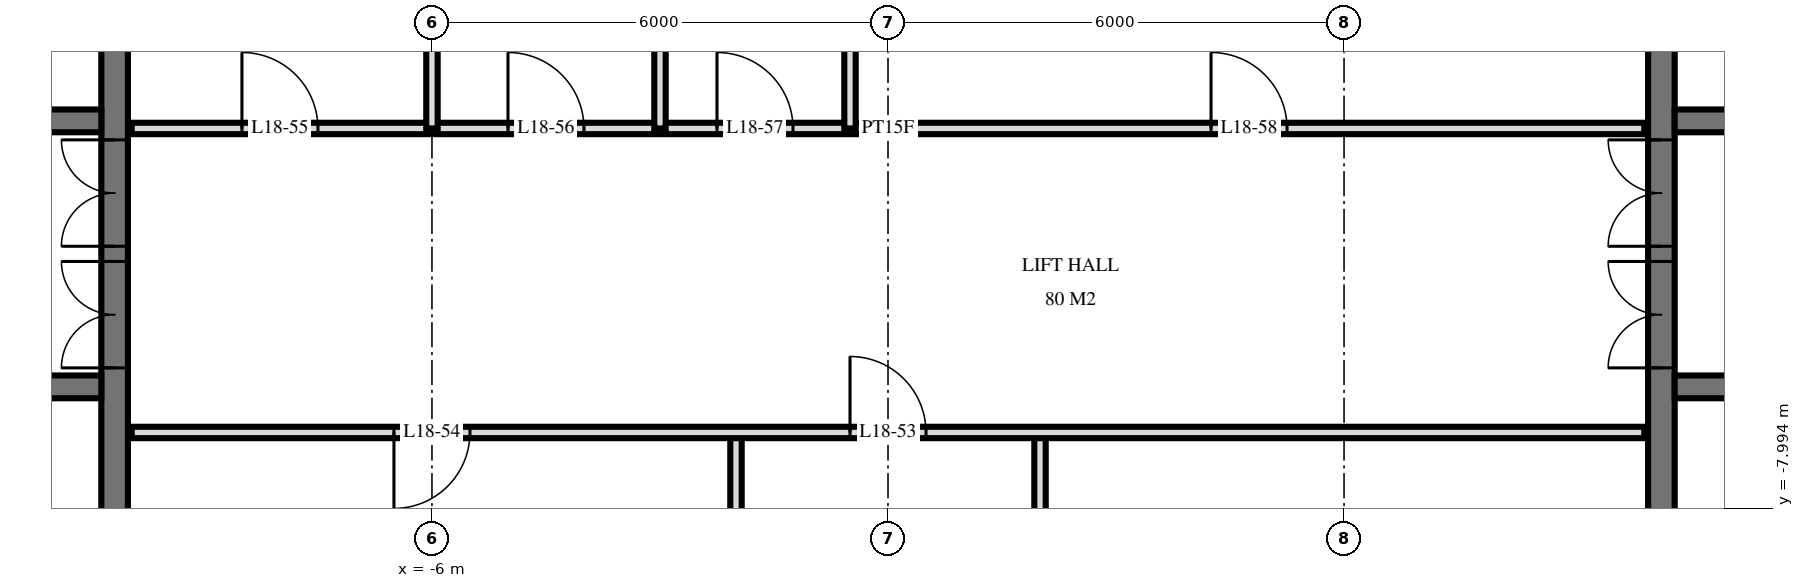
"""IFC4 building model, lengths in metres.
Left out: names, types, materials, properties, quantities, classifications, styles, units other than length and angle.
Written with IfcOpenShell. Run it as: python <this file> out.ifc"""

import sys

from ifc_helpers import new_model, si_unit, direction, frame, frame_2d, origin, place, context, subcontext, project, spatial, rectangle, extrude, element, fill, save


model = new_model("IFC4")
c1 = context("Model", 3, precision=1e-05, world=origin(), true_north=direction((0.0, 1.0)))
c2 = subcontext(c1, "Body", "Model", "MODEL_VIEW")
j1 = project(units=[si_unit("LENGTHUNIT", "METRE"), si_unit("PLANEANGLEUNIT", "RADIAN")], contexts=[c1])
p1 = place(None, origin())
s1 = spatial("IfcSite", under=j1, at=p1, CompositionType="ELEMENT")
p2 = place(p1, origin())
s2 = spatial("IfcBuilding", under=s1, at=p2, CompositionType="ELEMENT")
p3 = place(p2, frame((0.0, 0.0, 74.4)))
s3 = spatial("IfcBuildingStorey", under=s2, at=p3, CompositionType="ELEMENT", Elevation=74.4)
p4 = place(p3, frame((-10.175, -14.55, 0.0), z_axis=(0.0, 0.0, 1.0), x_axis=(0.0, 1.0, 0.0)))
e1 = element("IfcWall", 1, at=p4, inside=s3, PredefinedType="SHEAR", context=c2, shape_type="SweptSolid", body=[
    extrude(rectangle(XDim=14.1, YDim=0.35, at=frame_2d((7.05, 0.0))), origin(), (0.0, 0.0, 1.0), 3.6),
])
p5 = place(p4, frame((8.4, 0.0, 0.0)))
e2 = element("IfcOpeningElement", 2, at=p5, cuts=e1, PredefinedType="OPENING", context=c2, shape_type="SweptSolid", body=[
    extrude(rectangle(XDim=1.4, YDim=2.4, at=frame_2d((0.7, 1.2))), frame((0.0, 0.185, 0.0), z_axis=(0.0, -1.0, 0.0), x_axis=(1.0, 0.0, 0.0)), (0.0, 0.0, 1.0), 0.37),
])
p6 = place(p4, frame((10.0, 0.0, 0.0)))
e3 = element("IfcOpeningElement", 3, at=p6, cuts=e1, PredefinedType="OPENING", context=c2, shape_type="SweptSolid", body=[
    extrude(rectangle(XDim=1.4, YDim=2.4, at=frame_2d((0.7, 1.2))), frame((0.0, 0.185, 0.0), z_axis=(0.0, -1.0, 0.0), x_axis=(1.0, 0.0, 0.0)), (0.0, 0.0, 1.0), 0.37),
])
p7 = place(p4, frame((4.0, 0.0, 0.0)))
e4 = element("IfcOpeningElement", 4, at=p7, cuts=e1, PredefinedType="OPENING", context=c2, shape_type="SweptSolid", body=[
    extrude(rectangle(XDim=1.2, YDim=2.1, at=frame_2d((0.6, 1.05))), frame((0.0, 0.185, 0.0), z_axis=(0.0, -1.0, 0.0), x_axis=(1.0, 0.0, 0.0)), (0.0, 0.0, 1.0), 0.37),
])
p8 = place(p3, frame((-29.05, -2.9, 0.0), z_axis=(0.0, 0.0, 1.0), x_axis=(1.0, 0.0, 0.0)))
e5 = element("IfcWall", 5, at=p8, inside=s3, PredefinedType="SHEAR", context=c2, shape_type="SweptSolid", body=[
    extrude(rectangle(XDim=18.7, YDim=0.3, at=frame_2d((9.35, 0.0))), origin(), (0.0, 0.0, 1.0), 3.6),
])
p9 = place(p8, frame((2.95, 0.0, 0.0)))
e6 = element("IfcOpeningElement", 6, at=p9, cuts=e5, PredefinedType="OPENING", context=c2, shape_type="SweptSolid", body=[
    extrude(rectangle(XDim=1.1, YDim=2.1, at=frame_2d((0.55, 1.05))), frame((0.0, 0.16, 0.0), z_axis=(0.0, -1.0, 0.0), x_axis=(1.0, 0.0, 0.0)), (0.0, 0.0, 1.0), 0.32),
])
p10 = place(p8, frame((0.55, 0.0, 0.0)))
e7 = element("IfcOpeningElement", 7, at=p10, cuts=e5, PredefinedType="OPENING", context=c2, shape_type="SweptSolid", body=[
    extrude(rectangle(XDim=1.1, YDim=2.1, at=frame_2d((0.55, 1.05))), frame((0.0, 0.16, 0.0), z_axis=(0.0, -1.0, 0.0), x_axis=(1.0, 0.0, 0.0)), (0.0, 0.0, 1.0), 0.32),
])
p11 = place(p8, frame((11.863, 0.0, 0.0)))
e8 = element("IfcOpeningElement", 8, at=p11, cuts=e5, PredefinedType="OPENING", context=c2, shape_type="SweptSolid", body=[
    extrude(rectangle(XDim=0.9, YDim=2.1, at=frame_2d((0.45, 1.05))), frame((0.0, 0.16, 0.0), z_axis=(0.0, -1.0, 0.0), x_axis=(1.0, 0.0, 0.0)), (0.0, 0.0, 1.0), 0.32),
])
p12 = place(p8, frame((10.438, 0.0, 0.0)))
e9 = element("IfcOpeningElement", 9, at=p12, cuts=e5, PredefinedType="OPENING", context=c2, shape_type="SweptSolid", body=[
    extrude(rectangle(XDim=0.9, YDim=2.1, at=frame_2d((0.45, 1.05))), frame((0.0, 0.16, 0.0), z_axis=(0.0, -1.0, 0.0), x_axis=(1.0, 0.0, 0.0)), (0.0, 0.0, 1.0), 0.32),
])
p13 = place(p8, frame((16.85, 0.0, 0.0)))
e10 = element("IfcOpeningElement", 10, at=p13, cuts=e5, PredefinedType="OPENING", context=c2, shape_type="SweptSolid", body=[
    extrude(rectangle(XDim=1.0, YDim=2.1, at=frame_2d((0.5, 1.05))), frame((0.0, 0.16, 0.0), z_axis=(0.0, -1.0, 0.0), x_axis=(1.0, 0.0, 0.0)), (0.0, 0.0, 1.0), 0.32),
])
p14 = place(p8, frame((14.562, 0.0, 0.0)))
e11 = element("IfcOpeningElement", 11, at=p14, cuts=e5, PredefinedType="OPENING", context=c2, shape_type="SweptSolid", body=[
    extrude(rectangle(XDim=1.0, YDim=2.1, at=frame_2d((0.5, 1.05))), frame((0.0, 0.16, 0.0), z_axis=(0.0, -1.0, 0.0), x_axis=(1.0, 0.0, 0.0)), (0.0, 0.0, 1.0), 0.32),
])
p15 = place(p8, frame((13.137, 0.0, 0.0)))
e12 = element("IfcOpeningElement", 12, at=p15, cuts=e5, PredefinedType="OPENING", context=c2, shape_type="SweptSolid", body=[
    extrude(rectangle(XDim=1.0, YDim=2.1, at=frame_2d((0.5, 1.05))), frame((0.0, 0.16, 0.0), z_axis=(0.0, -1.0, 0.0), x_axis=(1.0, 0.0, 0.0)), (0.0, 0.0, 1.0), 0.32),
])
p16 = place(p8, frame((5.6, 0.0, 0.0)))
e13 = element("IfcOpeningElement", 13, at=p16, cuts=e5, PredefinedType="OPENING", context=c2, shape_type="SweptSolid", body=[
    extrude(rectangle(XDim=1.0, YDim=2.1, at=frame_2d((0.5, 1.05))), frame((0.0, 0.16, 0.0), z_axis=(0.0, -1.0, 0.0), x_axis=(1.0, 0.0, 0.0)), (0.0, 0.0, 1.0), 0.32),
])
p17 = place(p3, frame((-29.05, -6.4, 0.0), z_axis=(0.0, 0.0, 1.0), x_axis=(1.0, 0.0, 0.0)))
e14 = element("IfcWall", 14, at=p17, inside=s3, PredefinedType="SHEAR", context=c2, shape_type="SweptSolid", body=[
    extrude(rectangle(XDim=18.7, YDim=0.3, at=frame_2d((9.35, 0.0))), origin(), (0.0, 0.0, 1.0), 3.6),
])
p18 = place(p17, frame((2.95, 0.0, 0.0)))
e15 = element("IfcOpeningElement", 15, at=p18, cuts=e14, PredefinedType="OPENING", context=c2, shape_type="SweptSolid", body=[
    extrude(rectangle(XDim=1.1, YDim=2.1, at=frame_2d((0.55, 1.05))), frame((0.0, 0.16, 0.0), z_axis=(0.0, -1.0, 0.0), x_axis=(1.0, 0.0, 0.0)), (0.0, 0.0, 1.0), 0.32),
])
p19 = place(p17, frame((0.55, 0.0, 0.0)))
e16 = element("IfcOpeningElement", 16, at=p19, cuts=e14, PredefinedType="OPENING", context=c2, shape_type="SweptSolid", body=[
    extrude(rectangle(XDim=1.1, YDim=2.1, at=frame_2d((0.55, 1.05))), frame((0.0, 0.16, 0.0), z_axis=(0.0, -1.0, 0.0), x_axis=(1.0, 0.0, 0.0)), (0.0, 0.0, 1.0), 0.32),
])
p20 = place(p17, frame((10.8, 0.0, 0.0)))
e17 = element("IfcOpeningElement", 17, at=p20, cuts=e14, PredefinedType="OPENING", context=c2, shape_type="SweptSolid", body=[
    extrude(rectangle(XDim=1.1, YDim=2.1, at=frame_2d((0.55, 1.05))), frame((0.0, 0.16, 0.0), z_axis=(0.0, -1.0, 0.0), x_axis=(1.0, 0.0, 0.0)), (0.0, 0.0, 1.0), 0.32),
])
p21 = place(p17, frame((5.6, 0.0, 0.0)))
e18 = element("IfcOpeningElement", 18, at=p21, cuts=e14, PredefinedType="OPENING", context=c2, shape_type="SweptSolid", body=[
    extrude(rectangle(XDim=1.0, YDim=2.1, at=frame_2d((0.5, 1.05))), frame((0.0, 0.16, 0.0), z_axis=(0.0, -1.0, 0.0), x_axis=(1.0, 0.0, 0.0)), (0.0, 0.0, 1.0), 0.32),
])
p22 = place(p3, frame((10.175, -14.55, 0.0), z_axis=(0.0, 0.0, 1.0), x_axis=(0.0, 1.0, 0.0)))
e19 = element("IfcWall", 19, at=p22, inside=s3, PredefinedType="SHEAR", context=c2, shape_type="SweptSolid", body=[
    extrude(rectangle(XDim=14.1, YDim=0.35, at=frame_2d((7.05, 0.0))), origin(), (0.0, 0.0, 1.0), 3.6),
])
p23 = place(p22, frame((8.4, 0.0, 0.0)))
e20 = element("IfcOpeningElement", 20, at=p23, cuts=e19, PredefinedType="OPENING", context=c2, shape_type="SweptSolid", body=[
    extrude(rectangle(XDim=1.4, YDim=2.4, at=frame_2d((0.7, 1.2))), frame((0.0, 0.185, 0.0), z_axis=(0.0, -1.0, 0.0), x_axis=(1.0, 0.0, 0.0)), (0.0, 0.0, 1.0), 0.37),
])
p24 = place(p22, frame((10.0, 0.0, 0.0)))
e21 = element("IfcOpeningElement", 21, at=p24, cuts=e19, PredefinedType="OPENING", context=c2, shape_type="SweptSolid", body=[
    extrude(rectangle(XDim=1.4, YDim=2.4, at=frame_2d((0.7, 1.2))), frame((0.0, 0.185, 0.0), z_axis=(0.0, -1.0, 0.0), x_axis=(1.0, 0.0, 0.0)), (0.0, 0.0, 1.0), 0.37),
])
p25 = place(p22, frame((4.0, 0.0, 0.0)))
e22 = element("IfcOpeningElement", 22, at=p25, cuts=e19, PredefinedType="OPENING", context=c2, shape_type="SweptSolid", body=[
    extrude(rectangle(XDim=1.2, YDim=2.1, at=frame_2d((0.6, 1.05))), frame((0.0, 0.185, 0.0), z_axis=(0.0, -1.0, 0.0), x_axis=(1.0, 0.0, 0.0)), (0.0, 0.0, 1.0), 0.37),
])
p26 = place(p3, frame((10.35, -2.9, 0.0), z_axis=(0.0, 0.0, 1.0), x_axis=(1.0, 0.0, 0.0)))
e23 = element("IfcWall", 23, at=p26, inside=s3, PredefinedType="SHEAR", context=c2, shape_type="SweptSolid", body=[
    extrude(rectangle(XDim=18.7, YDim=0.3, at=frame_2d((9.35, 0.0))), origin(), (0.0, 0.0, 1.0), 3.6),
])
p27 = place(p26, frame((14.65, 0.0, 0.0)))
e24 = element("IfcOpeningElement", 24, at=p27, cuts=e23, PredefinedType="OPENING", context=c2, shape_type="SweptSolid", body=[
    extrude(rectangle(XDim=1.1, YDim=2.1, at=frame_2d((0.55, 1.05))), frame((0.0, 0.16, 0.0), z_axis=(0.0, -1.0, 0.0), x_axis=(1.0, 0.0, 0.0)), (0.0, 0.0, 1.0), 0.32),
])
p28 = place(p26, frame((17.05, 0.0, 0.0)))
e25 = element("IfcOpeningElement", 25, at=p28, cuts=e23, PredefinedType="OPENING", context=c2, shape_type="SweptSolid", body=[
    extrude(rectangle(XDim=1.1, YDim=2.1, at=frame_2d((0.55, 1.05))), frame((0.0, 0.16, 0.0), z_axis=(0.0, -1.0, 0.0), x_axis=(1.0, 0.0, 0.0)), (0.0, 0.0, 1.0), 0.32),
])
p29 = place(p26, frame((5.938, 0.0, 0.0)))
e26 = element("IfcOpeningElement", 26, at=p29, cuts=e23, PredefinedType="OPENING", context=c2, shape_type="SweptSolid", body=[
    extrude(rectangle(XDim=0.9, YDim=2.1, at=frame_2d((0.45, 1.05))), frame((0.0, 0.16, 0.0), z_axis=(0.0, -1.0, 0.0), x_axis=(1.0, 0.0, 0.0)), (0.0, 0.0, 1.0), 0.32),
])
p30 = place(p26, frame((7.363, 0.0, 0.0)))
e27 = element("IfcOpeningElement", 27, at=p30, cuts=e23, PredefinedType="OPENING", context=c2, shape_type="SweptSolid", body=[
    extrude(rectangle(XDim=0.9, YDim=2.1, at=frame_2d((0.45, 1.05))), frame((0.0, 0.16, 0.0), z_axis=(0.0, -1.0, 0.0), x_axis=(1.0, 0.0, 0.0)), (0.0, 0.0, 1.0), 0.32),
])
p31 = place(p26, frame((0.85, 0.0, 0.0)))
e28 = element("IfcOpeningElement", 28, at=p31, cuts=e23, PredefinedType="OPENING", context=c2, shape_type="SweptSolid", body=[
    extrude(rectangle(XDim=1.0, YDim=2.1, at=frame_2d((0.5, 1.05))), frame((0.0, 0.16, 0.0), z_axis=(0.0, -1.0, 0.0), x_axis=(1.0, 0.0, 0.0)), (0.0, 0.0, 1.0), 0.32),
])
p32 = place(p26, frame((3.137, 0.0, 0.0)))
e29 = element("IfcOpeningElement", 29, at=p32, cuts=e23, PredefinedType="OPENING", context=c2, shape_type="SweptSolid", body=[
    extrude(rectangle(XDim=1.0, YDim=2.1, at=frame_2d((0.5, 1.05))), frame((0.0, 0.16, 0.0), z_axis=(0.0, -1.0, 0.0), x_axis=(1.0, 0.0, 0.0)), (0.0, 0.0, 1.0), 0.32),
])
p33 = place(p26, frame((4.562, 0.0, 0.0)))
e30 = element("IfcOpeningElement", 30, at=p33, cuts=e23, PredefinedType="OPENING", context=c2, shape_type="SweptSolid", body=[
    extrude(rectangle(XDim=1.0, YDim=2.1, at=frame_2d((0.5, 1.05))), frame((0.0, 0.16, 0.0), z_axis=(0.0, -1.0, 0.0), x_axis=(1.0, 0.0, 0.0)), (0.0, 0.0, 1.0), 0.32),
])
p34 = place(p26, frame((12.1, 0.0, 0.0)))
e31 = element("IfcOpeningElement", 31, at=p34, cuts=e23, PredefinedType="OPENING", context=c2, shape_type="SweptSolid", body=[
    extrude(rectangle(XDim=1.0, YDim=2.1, at=frame_2d((0.5, 1.05))), frame((0.0, 0.16, 0.0), z_axis=(0.0, -1.0, 0.0), x_axis=(1.0, 0.0, 0.0)), (0.0, 0.0, 1.0), 0.32),
])
p35 = place(p3, frame((10.35, -6.4, 0.0), z_axis=(0.0, 0.0, 1.0), x_axis=(1.0, 0.0, 0.0)))
e32 = element("IfcWall", 32, at=p35, inside=s3, PredefinedType="SHEAR", context=c2, shape_type="SweptSolid", body=[
    extrude(rectangle(XDim=18.7, YDim=0.3, at=frame_2d((9.35, 0.0))), origin(), (0.0, 0.0, 1.0), 3.6),
])
p36 = place(p35, frame((14.65, 0.0, 0.0)))
e33 = element("IfcOpeningElement", 33, at=p36, cuts=e32, PredefinedType="OPENING", context=c2, shape_type="SweptSolid", body=[
    extrude(rectangle(XDim=1.1, YDim=2.1, at=frame_2d((0.55, 1.05))), frame((0.0, 0.16, 0.0), z_axis=(0.0, -1.0, 0.0), x_axis=(1.0, 0.0, 0.0)), (0.0, 0.0, 1.0), 0.32),
])
p37 = place(p35, frame((17.05, 0.0, 0.0)))
e34 = element("IfcOpeningElement", 34, at=p37, cuts=e32, PredefinedType="OPENING", context=c2, shape_type="SweptSolid", body=[
    extrude(rectangle(XDim=1.1, YDim=2.1, at=frame_2d((0.55, 1.05))), frame((0.0, 0.16, 0.0), z_axis=(0.0, -1.0, 0.0), x_axis=(1.0, 0.0, 0.0)), (0.0, 0.0, 1.0), 0.32),
])
p38 = place(p35, frame((6.8, 0.0, 0.0)))
e35 = element("IfcOpeningElement", 35, at=p38, cuts=e32, PredefinedType="OPENING", context=c2, shape_type="SweptSolid", body=[
    extrude(rectangle(XDim=1.1, YDim=2.1, at=frame_2d((0.55, 1.05))), frame((0.0, 0.16, 0.0), z_axis=(0.0, -1.0, 0.0), x_axis=(1.0, 0.0, 0.0)), (0.0, 0.0, 1.0), 0.32),
])
p39 = place(p35, frame((12.1, 0.0, 0.0)))
e36 = element("IfcOpeningElement", 36, at=p39, cuts=e32, PredefinedType="OPENING", context=c2, shape_type="SweptSolid", body=[
    extrude(rectangle(XDim=1.0, YDim=2.1, at=frame_2d((0.5, 1.05))), frame((0.0, 0.16, 0.0), z_axis=(0.0, -1.0, 0.0), x_axis=(1.0, 0.0, 0.0)), (0.0, 0.0, 1.0), 0.32),
])
p40 = place(p3, frame((2.0, -11.0, 0.0), z_axis=(0.0, 0.0, 1.0), x_axis=(0.0, 1.0, 0.0)))
e37 = element("IfcWall", 37, at=p40, inside=s3, PredefinedType="PARTITIONING", context=c2, shape_type="SweptSolid", body=[
    extrude(rectangle(XDim=4.0, YDim=0.15, at=frame_2d((2.0, 0.0))), origin(), (0.0, 0.0, 1.0), 3.32),
])
p41 = place(p3, frame((-0.5, -3.0, 0.0), z_axis=(0.0, 0.0, 1.0), x_axis=(0.0, 1.0, 0.0)))
e38 = element("IfcWall", 38, at=p41, inside=s3, PredefinedType="PLUMBINGWALL", context=c2, shape_type="SweptSolid", body=[
    extrude(rectangle(XDim=4.02, YDim=0.15, at=frame_2d((2.01, 0.0))), origin(), (0.0, 0.0, 1.0), 3.32),
])
p42 = place(p3, frame((-2.0, -11.0, 0.0), z_axis=(0.0, 0.0, 1.0), x_axis=(0.0, 1.0, 0.0)))
e39 = element("IfcWall", 39, at=p42, inside=s3, PredefinedType="PARTITIONING", context=c2, shape_type="SweptSolid", body=[
    extrude(rectangle(XDim=4.0, YDim=0.15, at=frame_2d((2.0, 0.0))), origin(), (0.0, 0.0, 1.0), 3.32),
])
for number, where, z_axis, x_axis in (
    (40, (-3.0, -3.0, 0.0), (0.0, 0.0, 1.0), (0.0, 1.0, 0.0)),
    (41, (-6.0, -3.0, 0.0), (0.0, 0.0, 1.0), (0.0, 1.0, 0.0)),
):
    element("IfcWall", number, at=place(p3, frame(where, z_axis=z_axis, x_axis=x_axis)), inside=s3, PredefinedType="PLUMBINGWALL", context=c2, shape_type="SweptSolid", body=[
        extrude(rectangle(XDim=4.02, YDim=0.15, at=frame_2d((2.01, 0.0))), origin(), (0.0, 0.0, 1.0), 3.32),
    ])
p43 = place(p3, frame((-9.95, -7.0, 0.0), z_axis=(0.0, 0.0, 1.0), x_axis=(1.0, 0.0, 0.0)))
e42 = element("IfcWall", 42, at=p43, inside=s3, PredefinedType="PARTITIONING", context=c2, shape_type="SweptSolid", body=[
    extrude(rectangle(XDim=19.9, YDim=0.15, at=frame_2d((9.95, 0.0))), origin(), (0.0, 0.0, 1.0), 3.32),
])
p44 = place(p43, frame((9.45, 0.0, 0.0)))
e43 = element("IfcOpeningElement", 43, at=p44, cuts=e42, PredefinedType="OPENING", context=c2, shape_type="SweptSolid", body=[
    extrude(rectangle(XDim=1.0, YDim=2.1, at=frame_2d((0.5, 1.05))), frame((0.0, 0.085, 0.0), z_axis=(0.0, -1.0, 0.0), x_axis=(1.0, 0.0, 0.0)), (0.0, 0.0, 1.0), 0.17),
])
p45 = place(p43, frame((3.45, 0.0, 0.0)))
e44 = element("IfcOpeningElement", 44, at=p45, cuts=e42, PredefinedType="OPENING", context=c2, shape_type="SweptSolid", body=[
    extrude(rectangle(XDim=1.0, YDim=2.1, at=frame_2d((0.5, 1.05))), frame((0.0, 0.085, 0.0), z_axis=(0.0, -1.0, 0.0), x_axis=(1.0, 0.0, 0.0)), (0.0, 0.0, 1.0), 0.17),
])
p46 = place(p3, frame((-9.95, -3.0, 0.0), z_axis=(0.0, 0.0, 1.0), x_axis=(1.0, 0.0, 0.0)))
e45 = element("IfcWall", 45, at=p46, inside=s3, PredefinedType="PARTITIONING", context=c2, shape_type="SweptSolid", body=[
    extrude(rectangle(XDim=19.9, YDim=0.15, at=frame_2d((9.95, 0.0))), origin(), (0.0, 0.0, 1.0), 3.32),
])
p47 = place(p46, frame((1.45, 0.0, 0.0)))
e46 = element("IfcOpeningElement", 46, at=p47, cuts=e45, PredefinedType="OPENING", context=c2, shape_type="SweptSolid", body=[
    extrude(rectangle(XDim=1.0, YDim=2.1, at=frame_2d((0.5, 1.05))), frame((0.0, 0.085, 0.0), z_axis=(0.0, -1.0, 0.0), x_axis=(1.0, 0.0, 0.0)), (0.0, 0.0, 1.0), 0.17),
])
p48 = place(p46, frame((4.95, 0.0, 0.0)))
e47 = element("IfcOpeningElement", 47, at=p48, cuts=e45, PredefinedType="OPENING", context=c2, shape_type="SweptSolid", body=[
    extrude(rectangle(XDim=1.0, YDim=2.1, at=frame_2d((0.5, 1.05))), frame((0.0, 0.085, 0.0), z_axis=(0.0, -1.0, 0.0), x_axis=(1.0, 0.0, 0.0)), (0.0, 0.0, 1.0), 0.17),
])
p49 = place(p46, frame((7.7, 0.0, 0.0)))
e48 = element("IfcOpeningElement", 48, at=p49, cuts=e45, PredefinedType="OPENING", context=c2, shape_type="SweptSolid", body=[
    extrude(rectangle(XDim=1.0, YDim=2.1, at=frame_2d((0.5, 1.05))), frame((0.0, 0.085, 0.0), z_axis=(0.0, -1.0, 0.0), x_axis=(1.0, 0.0, 0.0)), (0.0, 0.0, 1.0), 0.17),
])
p50 = place(p46, frame((14.2, 0.0, 0.0)))
e49 = element("IfcOpeningElement", 49, at=p50, cuts=e45, PredefinedType="OPENING", context=c2, shape_type="SweptSolid", body=[
    extrude(rectangle(XDim=1.0, YDim=2.1, at=frame_2d((0.5, 1.05))), frame((0.0, 0.085, 0.0), z_axis=(0.0, -1.0, 0.0), x_axis=(1.0, 0.0, 0.0)), (0.0, 0.0, 1.0), 0.17),
])
p51 = place(p5, origin())
e50 = element("IfcDoor", 50, at=p51, inside=s3, OperationType="DOUBLE_DOOR_SINGLE_SWING", PredefinedType="DOOR", context=c2, shape_type="SweptSolid", body=[
    extrude(rectangle(XDim=1.4, YDim=2.4, at=frame_2d((0.7, 1.2))), frame((0.0, 0.025, 0.0), z_axis=(0.0, -1.0, 0.0), x_axis=(1.0, 0.0, 0.0)), (0.0, 0.0, 1.0), 0.05),
])
fill(e2, e50)
p52 = place(p6, origin())
e51 = element("IfcDoor", 51, at=p52, inside=s3, OperationType="DOUBLE_DOOR_SINGLE_SWING", PredefinedType="DOOR", context=c2, shape_type="SweptSolid", body=[
    extrude(rectangle(XDim=1.4, YDim=2.4, at=frame_2d((0.7, 1.2))), frame((0.0, 0.025, 0.0), z_axis=(0.0, -1.0, 0.0), x_axis=(1.0, 0.0, 0.0)), (0.0, 0.0, 1.0), 0.05),
])
fill(e3, e51)
p53 = place(p23, origin())
e52 = element("IfcDoor", 52, at=p53, inside=s3, OperationType="DOUBLE_DOOR_SINGLE_SWING", PredefinedType="DOOR", context=c2, shape_type="SweptSolid", body=[
    extrude(rectangle(XDim=1.4, YDim=2.4, at=frame_2d((0.7, 1.2))), frame((0.0, 0.025, 0.0), z_axis=(0.0, -1.0, 0.0), x_axis=(1.0, 0.0, 0.0)), (0.0, 0.0, 1.0), 0.05),
])
fill(e20, e52)
p54 = place(p24, origin())
e53 = element("IfcDoor", 53, at=p54, inside=s3, OperationType="DOUBLE_DOOR_SINGLE_SWING", PredefinedType="DOOR", context=c2, shape_type="SweptSolid", body=[
    extrude(rectangle(XDim=1.4, YDim=2.4, at=frame_2d((0.7, 1.2))), frame((0.0, 0.025, 0.0), z_axis=(0.0, -1.0, 0.0), x_axis=(1.0, 0.0, 0.0)), (0.0, 0.0, 1.0), 0.05),
])
fill(e21, e53)
p55 = place(p44, origin())
e54 = element("IfcDoor", 54, at=p55, inside=s3, OperationType="SINGLE_SWING_RIGHT", PredefinedType="DOOR", context=c2, shape_type="SweptSolid", body=[
    extrude(rectangle(XDim=1.0, YDim=2.1, at=frame_2d((0.5, 1.05))), frame((0.0, 0.025, 0.0), z_axis=(0.0, -1.0, 0.0), x_axis=(1.0, 0.0, 0.0)), (0.0, 0.0, 1.0), 0.05),
])
fill(e43, e54)
p56 = place(p45, frame((0.5, 0.0, 0.0), z_axis=(0.0, 0.0, 1.0), x_axis=(-1.0, 0.0, 0.0)))
e55 = element("IfcDoor", 55, at=p56, inside=s3, OperationType="SINGLE_SWING_LEFT", PredefinedType="DOOR", context=c2, shape_type="SweptSolid", body=[
    extrude(rectangle(XDim=1.0, YDim=2.1, at=frame_2d((0.0, 1.05))), frame((0.0, -0.025, 0.0), z_axis=(0.0, 1.0, 0.0), x_axis=(-1.0, 0.0, 0.0)), (0.0, 0.0, 1.0), 0.05),
])
fill(e44, e55)
p57 = place(p47, origin())
e56 = element("IfcDoor", 56, at=p57, inside=s3, OperationType="SINGLE_SWING_RIGHT", PredefinedType="DOOR", context=c2, shape_type="SweptSolid", body=[
    extrude(rectangle(XDim=1.0, YDim=2.1, at=frame_2d((0.5, 1.05))), frame((0.0, 0.025, 0.0), z_axis=(0.0, -1.0, 0.0), x_axis=(1.0, 0.0, 0.0)), (0.0, 0.0, 1.0), 0.05),
])
fill(e46, e56)
p58 = place(p48, origin())
e57 = element("IfcDoor", 57, at=p58, inside=s3, OperationType="SINGLE_SWING_RIGHT", PredefinedType="DOOR", context=c2, shape_type="SweptSolid", body=[
    extrude(rectangle(XDim=1.0, YDim=2.1, at=frame_2d((0.5, 1.05))), frame((0.0, 0.025, 0.0), z_axis=(0.0, -1.0, 0.0), x_axis=(1.0, 0.0, 0.0)), (0.0, 0.0, 1.0), 0.05),
])
fill(e47, e57)
p59 = place(p49, origin())
e58 = element("IfcDoor", 58, at=p59, inside=s3, OperationType="SINGLE_SWING_RIGHT", PredefinedType="DOOR", context=c2, shape_type="SweptSolid", body=[
    extrude(rectangle(XDim=1.0, YDim=2.1, at=frame_2d((0.5, 1.05))), frame((0.0, 0.025, 0.0), z_axis=(0.0, -1.0, 0.0), x_axis=(1.0, 0.0, 0.0)), (0.0, 0.0, 1.0), 0.05),
])
fill(e48, e58)
p60 = place(p50, origin())
e59 = element("IfcDoor", 59, at=p60, inside=s3, OperationType="SINGLE_SWING_RIGHT", PredefinedType="DOOR", context=c2, shape_type="SweptSolid", body=[
    extrude(rectangle(XDim=1.0, YDim=2.1, at=frame_2d((0.5, 1.05))), frame((0.0, 0.025, 0.0), z_axis=(0.0, -1.0, 0.0), x_axis=(1.0, 0.0, 0.0)), (0.0, 0.0, 1.0), 0.05),
])
fill(e49, e59)
save(model, sys.argv[1])
